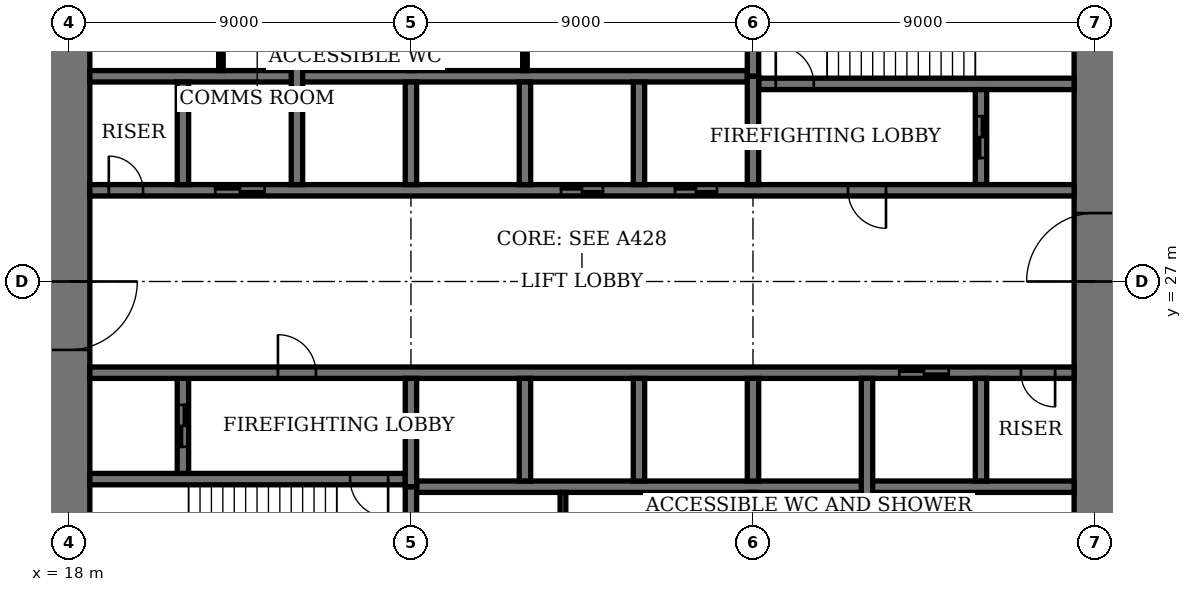
"""IFC4 building model, lengths in metres.
Left out: names, types, materials, properties, quantities, classifications, styles, units other than length and angle.
Written with IfcOpenShell. Run it as: python <this file> out.ifc"""

import sys

from ifc_helpers import new_model, si_unit, direction, frame, frame_2d, origin, place, context, subcontext, project, spatial, rectangle, extrude, element, fill, save


model = new_model("IFC4")
c1 = context("Model", 3, precision=1e-05, world=origin(), true_north=direction((0.0, 1.0)))
c2 = subcontext(c1, "Body", "Model", "MODEL_VIEW")
j1 = project(units=[si_unit("LENGTHUNIT", "METRE"), si_unit("PLANEANGLEUNIT", "RADIAN")], contexts=[c1])
p1 = place(None, origin())
s1 = spatial("IfcSite", under=j1, at=p1, CompositionType="ELEMENT")
p2 = place(p1, origin())
s2 = spatial("IfcBuilding", under=s1, at=p2, CompositionType="ELEMENT")
p3 = place(p2, frame((0.0, 0.0, 93.0)))
s3 = spatial("IfcBuildingStorey", under=s2, at=p3, CompositionType="ELEMENT", Elevation=93.0)
p4 = place(p3, frame((18.0, 35.45, 0.0), z_axis=(0.0, 0.0, 1.0), x_axis=(0.0, -1.0, 0.0)))
e1 = element("IfcWall", 1, at=p4, inside=s3, PredefinedType="SHEAR", context=c2, shape_type="SweptSolid", body=[
    extrude(rectangle(XDim=16.9, YDim=1.1, at=frame_2d((8.45, 0.0))), origin(), (0.0, 0.0, 1.0), 4.0),
])
p5 = place(p4, frame((8.45, 0.0, 0.0)))
e2 = element("IfcOpeningElement", 2, at=p5, cuts=e1, PredefinedType="OPENING", context=c2, shape_type="SweptSolid", body=[
    extrude(rectangle(XDim=1.8, YDim=2.4, at=frame_2d((0.9, 1.2))), frame((0.0, 0.56, 0.0), z_axis=(0.0, -1.0, 0.0), x_axis=(1.0, 0.0, 0.0)), (0.0, 0.0, 1.0), 1.12),
])
p6 = place(p3, frame((45.0, 18.55, 0.0), z_axis=(0.0, 0.0, 1.0), x_axis=(0.0, 1.0, 0.0)))
e3 = element("IfcWall", 3, at=p6, inside=s3, PredefinedType="SHEAR", context=c2, shape_type="SweptSolid", body=[
    extrude(rectangle(XDim=16.9, YDim=1.1, at=frame_2d((8.45, 0.0))), origin(), (0.0, 0.0, 1.0), 4.0),
])
p7 = place(p6, frame((8.45, 0.0, 0.0)))
e4 = element("IfcOpeningElement", 4, at=p7, cuts=e3, PredefinedType="OPENING", context=c2, shape_type="SweptSolid", body=[
    extrude(rectangle(XDim=1.8, YDim=2.4, at=frame_2d((0.9, 1.2))), frame((0.0, 0.56, 0.0), z_axis=(0.0, -1.0, 0.0), x_axis=(1.0, 0.0, 0.0)), (0.0, 0.0, 1.0), 1.12),
])
p8 = place(p3, frame((18.55, 21.8, 0.0), z_axis=(0.0, 0.0, 1.0), x_axis=(1.0, 0.0, 0.0)))
e5 = element("IfcWall", 5, at=p8, inside=s3, PredefinedType="SHEAR", context=c2, shape_type="SweptSolid", body=[
    extrude(rectangle(XDim=8.3, YDim=0.3, at=frame_2d((4.15, 0.0))), origin(), (0.0, 0.0, 1.0), 4.0),
])
p9 = place(p8, frame((6.85, 0.0, 0.0)))
e6 = element("IfcOpeningElement", 6, at=p9, cuts=e5, PredefinedType="OPENING", context=c2, shape_type="SweptSolid", body=[
    extrude(rectangle(XDim=1.0, YDim=2.4, at=frame_2d((0.5, 1.2))), frame((0.0, 0.16, 0.0), z_axis=(0.0, -1.0, 0.0), x_axis=(1.0, 0.0, 0.0)), (0.0, 0.0, 1.0), 0.32),
])
p10 = place(p3, frame((36.15, 32.2, 0.0), z_axis=(0.0, 0.0, 1.0), x_axis=(1.0, 0.0, 0.0)))
e7 = element("IfcWall", 7, at=p10, inside=s3, PredefinedType="SHEAR", context=c2, shape_type="SweptSolid", body=[
    extrude(rectangle(XDim=8.3, YDim=0.3, at=frame_2d((4.15, 0.0))), origin(), (0.0, 0.0, 1.0), 4.0),
])
p11 = place(p10, frame((0.45, 0.0, 0.0)))
e8 = element("IfcOpeningElement", 8, at=p11, cuts=e7, PredefinedType="OPENING", context=c2, shape_type="SweptSolid", body=[
    extrude(rectangle(XDim=1.0, YDim=2.4, at=frame_2d((0.5, 1.2))), frame((0.0, 0.16, 0.0), z_axis=(0.0, -1.0, 0.0), x_axis=(1.0, 0.0, 0.0)), (0.0, 0.0, 1.0), 0.32),
])
for number, where, z_axis, x_axis in (
    (9, (27.0, 18.55, 0.0), (0.0, 0.0, 1.0), (0.0, 1.0, 0.0)),
    (10, (36.0, 32.4, 0.0), (0.0, 0.0, 1.0), (0.0, 1.0, 0.0)),
):
    element("IfcWall", number, at=place(p3, frame(where, z_axis=z_axis, x_axis=x_axis)), inside=s3, PredefinedType="SHEAR", context=c2, shape_type="SweptSolid", body=[
        extrude(rectangle(XDim=3.05, YDim=0.3, at=frame_2d((1.525, 0.0))), origin(), (0.0, 0.0, 1.0), 4.0),
    ])
p12 = place(p3, frame((21.0, 21.95, 0.0), z_axis=(0.0, 0.0, 1.0), x_axis=(0.0, 1.0, 0.0)))
e11 = element("IfcWall", 11, at=p12, inside=s3, PredefinedType="SHEAR", context=c2, shape_type="SweptSolid", body=[
    extrude(rectangle(XDim=2.5, YDim=0.3, at=frame_2d((1.25, 0.0))), origin(), (0.0, 0.0, 1.0), 4.0),
])
p13 = place(p12, frame((0.7, 0.0, 0.0)))
e12 = element("IfcOpeningElement", 12, at=p13, cuts=e11, PredefinedType="OPENING", context=c2, shape_type="SweptSolid", body=[
    extrude(rectangle(XDim=1.1, YDim=2.4, at=frame_2d((0.55, 1.2))), frame((0.0, 0.16, 0.0), z_axis=(0.0, -1.0, 0.0), x_axis=(1.0, 0.0, 0.0)), (0.0, 0.0, 1.0), 0.32),
])
p14 = place(p3, frame((42.0, 29.55, 0.0), z_axis=(0.0, 0.0, 1.0), x_axis=(0.0, 1.0, 0.0)))
e13 = element("IfcWall", 13, at=p14, inside=s3, PredefinedType="SHEAR", context=c2, shape_type="SweptSolid", body=[
    extrude(rectangle(XDim=2.5, YDim=0.3, at=frame_2d((1.25, 0.0))), origin(), (0.0, 0.0, 1.0), 4.0),
])
p15 = place(p14, frame((0.7, 0.0, 0.0)))
e14 = element("IfcOpeningElement", 14, at=p15, cuts=e13, PredefinedType="OPENING", context=c2, shape_type="SweptSolid", body=[
    extrude(rectangle(XDim=1.1, YDim=2.4, at=frame_2d((0.55, 1.2))), frame((0.0, 0.16, 0.0), z_axis=(0.0, -1.0, 0.0), x_axis=(1.0, 0.0, 0.0)), (0.0, 0.0, 1.0), 0.32),
])
p16 = place(p3, frame((18.55, 24.6, 0.0), z_axis=(0.0, 0.0, 1.0), x_axis=(1.0, 0.0, 0.0)))
e15 = element("IfcWall", 15, at=p16, inside=s3, PredefinedType="SHEAR", context=c2, shape_type="SweptSolid", body=[
    extrude(rectangle(XDim=25.9, YDim=0.3, at=frame_2d((12.95, 0.0))), origin(), (0.0, 0.0, 1.0), 4.0),
])
p17 = place(p16, frame((4.95, 0.0, 0.0)))
e16 = element("IfcOpeningElement", 16, at=p17, cuts=e15, PredefinedType="OPENING", context=c2, shape_type="SweptSolid", body=[
    extrude(rectangle(XDim=1.0, YDim=2.4, at=frame_2d((0.5, 1.2))), frame((0.0, 0.16, 0.0), z_axis=(0.0, -1.0, 0.0), x_axis=(1.0, 0.0, 0.0)), (0.0, 0.0, 1.0), 0.32),
])
p18 = place(p16, frame((24.5, 0.0, 0.0)))
e17 = element("IfcOpeningElement", 17, at=p18, cuts=e15, PredefinedType="OPENING", context=c2, shape_type="SweptSolid", body=[
    extrude(rectangle(XDim=0.9, YDim=2.1, at=frame_2d((0.45, 1.05))), frame((0.0, 0.16, 0.0), z_axis=(0.0, -1.0, 0.0), x_axis=(1.0, 0.0, 0.0)), (0.0, 0.0, 1.0), 0.32),
])
p19 = place(p16, frame((21.3, 0.0, 0.0)))
e18 = element("IfcOpeningElement", 18, at=p19, cuts=e15, PredefinedType="OPENING", context=c2, shape_type="SweptSolid", body=[
    extrude(rectangle(XDim=1.3, YDim=2.4, at=frame_2d((0.65, 1.2))), frame((0.0, 0.16, 0.0), z_axis=(0.0, -1.0, 0.0), x_axis=(1.0, 0.0, 0.0)), (0.0, 0.0, 1.0), 0.32),
])
p20 = place(p3, frame((18.55, 29.4, 0.0), z_axis=(0.0, 0.0, 1.0), x_axis=(1.0, 0.0, 0.0)))
e19 = element("IfcWall", 19, at=p20, inside=s3, PredefinedType="SHEAR", context=c2, shape_type="SweptSolid", body=[
    extrude(rectangle(XDim=25.9, YDim=0.3, at=frame_2d((12.95, 0.0))), origin(), (0.0, 0.0, 1.0), 4.0),
])
p21 = place(p20, frame((19.95, 0.0, 0.0)))
e20 = element("IfcOpeningElement", 20, at=p21, cuts=e19, PredefinedType="OPENING", context=c2, shape_type="SweptSolid", body=[
    extrude(rectangle(XDim=1.0, YDim=2.4, at=frame_2d((0.5, 1.2))), frame((0.0, 0.16, 0.0), z_axis=(0.0, -1.0, 0.0), x_axis=(1.0, 0.0, 0.0)), (0.0, 0.0, 1.0), 0.32),
])
p22 = place(p20, frame((0.5, 0.0, 0.0)))
e21 = element("IfcOpeningElement", 21, at=p22, cuts=e19, PredefinedType="OPENING", context=c2, shape_type="SweptSolid", body=[
    extrude(rectangle(XDim=0.9, YDim=2.1, at=frame_2d((0.45, 1.05))), frame((0.0, 0.16, 0.0), z_axis=(0.0, -1.0, 0.0), x_axis=(1.0, 0.0, 0.0)), (0.0, 0.0, 1.0), 0.32),
])
p23 = place(p20, frame((15.4, 0.0, 0.0)))
e22 = element("IfcOpeningElement", 22, at=p23, cuts=e19, PredefinedType="OPENING", context=c2, shape_type="SweptSolid", body=[
    extrude(rectangle(XDim=1.1, YDim=2.4, at=frame_2d((0.55, 1.2))), frame((0.0, 0.16, 0.0), z_axis=(0.0, -1.0, 0.0), x_axis=(1.0, 0.0, 0.0)), (0.0, 0.0, 1.0), 0.32),
])
p24 = place(p20, frame((12.4, 0.0, 0.0)))
e23 = element("IfcOpeningElement", 23, at=p24, cuts=e19, PredefinedType="OPENING", context=c2, shape_type="SweptSolid", body=[
    extrude(rectangle(XDim=1.1, YDim=2.4, at=frame_2d((0.55, 1.2))), frame((0.0, 0.16, 0.0), z_axis=(0.0, -1.0, 0.0), x_axis=(1.0, 0.0, 0.0)), (0.0, 0.0, 1.0), 0.32),
])
p25 = place(p20, frame((3.3, 0.0, 0.0)))
e24 = element("IfcOpeningElement", 24, at=p25, cuts=e19, PredefinedType="OPENING", context=c2, shape_type="SweptSolid", body=[
    extrude(rectangle(XDim=1.3, YDim=2.4, at=frame_2d((0.65, 1.2))), frame((0.0, 0.16, 0.0), z_axis=(0.0, -1.0, 0.0), x_axis=(1.0, 0.0, 0.0)), (0.0, 0.0, 1.0), 0.32),
])
for number, where, z_axis, x_axis in (
    (25, (27.15, 21.6, 0.0), (0.0, 0.0, 1.0), (1.0, 0.0, 0.0)),
    (26, (18.55, 32.4, 0.0), (0.0, 0.0, 1.0), (1.0, 0.0, 0.0)),
):
    element("IfcWall", number, at=place(p3, frame(where, z_axis=z_axis, x_axis=x_axis)), inside=s3, PredefinedType="SHEAR", context=c2, shape_type="SweptSolid", body=[
        extrude(rectangle(XDim=17.3, YDim=0.3, at=frame_2d((8.65, 0.0))), origin(), (0.0, 0.0, 1.0), 4.0),
    ])
for number, where, z_axis, x_axis in (
    (27, (30.0, 21.75, 0.0), (0.0, 0.0, 1.0), (0.0, 1.0, 0.0)),
    (28, (33.0, 29.55, 0.0), (0.0, 0.0, 1.0), (0.0, 1.0, 0.0)),
    (29, (33.0, 21.75, 0.0), (0.0, 0.0, 1.0), (0.0, 1.0, 0.0)),
    (30, (30.0, 29.55, 0.0), (0.0, 0.0, 1.0), (0.0, 1.0, 0.0)),
    (31, (36.0, 21.75, 0.0), (0.0, 0.0, 1.0), (0.0, 1.0, 0.0)),
    (32, (27.0, 29.55, 0.0), (0.0, 0.0, 1.0), (0.0, 1.0, 0.0)),
):
    element("IfcWall", number, at=place(p3, frame(where, z_axis=z_axis, x_axis=x_axis)), inside=s3, PredefinedType="SHEAR", context=c2, shape_type="SweptSolid", body=[
        extrude(rectangle(XDim=2.7, YDim=0.3, at=frame_2d((1.35, 0.0))), origin(), (0.0, 0.0, 1.0), 4.0),
    ])
for number, where, z_axis, x_axis in (
    (33, (39.0, 18.55, 0.0), (0.0, 0.0, 1.0), (0.0, 1.0, 0.0)),
    (34, (24.0, 29.55, 0.0), (0.0, 0.0, 1.0), (0.0, 1.0, 0.0)),
):
    element("IfcWall", number, at=place(p3, frame(where, z_axis=z_axis, x_axis=x_axis)), inside=s3, PredefinedType="SHEAR", context=c2, shape_type="SweptSolid", body=[
        extrude(rectangle(XDim=5.9, YDim=0.3, at=frame_2d((2.95, 0.0))), origin(), (0.0, 0.0, 1.0), 4.0),
    ])
for number, where, z_axis, x_axis in (
    (35, (42.0, 21.75, 0.0), (0.0, 0.0, 1.0), (0.0, 1.0, 0.0)),
    (36, (21.0, 29.55, 0.0), (0.0, 0.0, 1.0), (0.0, 1.0, 0.0)),
):
    element("IfcWall", number, at=place(p3, frame(where, z_axis=z_axis, x_axis=x_axis)), inside=s3, PredefinedType="SHEAR", context=c2, shape_type="SweptSolid", body=[
        extrude(rectangle(XDim=2.7, YDim=0.3, at=frame_2d((1.35, 0.0))), origin(), (0.0, 0.0, 1.0), 4.0),
    ])
for number, where, z_axis, x_axis in (
    (37, (27.0, 21.6, 0.0), (0.0, 0.0, 1.0), (0.0, 1.0, 0.0)),
    (38, (36.0, 29.55, 0.0), (0.0, 0.0, 1.0), (0.0, 1.0, 0.0)),
):
    element("IfcWall", number, at=place(p3, frame(where, z_axis=z_axis, x_axis=x_axis)), inside=s3, PredefinedType="SHEAR", context=c2, shape_type="SweptSolid", body=[
        extrude(rectangle(XDim=2.85, YDim=0.3, at=frame_2d((1.425, 0.0))), origin(), (0.0, 0.0, 1.0), 4.0),
    ])
for number, where, z_axis, x_axis in (
    (39, (31.0, 18.55, 0.0), (0.0, 0.0, 1.0), (0.0, 1.0, 0.0)),
    (40, (36.0, 18.55, 0.0), (0.0, 0.0, 1.0), (0.0, 1.0, 0.0)),
):
    element("IfcWall", number, at=place(p3, frame(where, z_axis=z_axis, x_axis=x_axis)), inside=s3, PredefinedType="PARTITIONING", context=c2, shape_type="SweptSolid", body=[
        extrude(rectangle(XDim=2.9, YDim=0.15, at=frame_2d((1.45, 0.0))), origin(), (0.0, 0.0, 1.0), 3.75),
    ])
p26 = place(p3, frame((30.0, 32.55, 0.0), z_axis=(0.0, 0.0, 1.0), x_axis=(0.0, 1.0, 0.0)))
e41 = element("IfcWall", 41, at=p26, inside=s3, PredefinedType="PARTITIONING", context=c2, shape_type="SweptSolid", body=[
    extrude(rectangle(XDim=2.9, YDim=0.12, at=frame_2d((1.45, 0.0))), origin(), (0.0, 0.0, 1.0), 3.75),
])
p27 = place(p3, frame((27.0, 32.55, 0.0), z_axis=(0.0, 0.0, 1.0), x_axis=(0.0, 1.0, 0.0)))
e42 = element("IfcWall", 42, at=p27, inside=s3, PredefinedType="PARTITIONING", context=c2, shape_type="SweptSolid", body=[
    extrude(rectangle(XDim=2.9, YDim=0.15, at=frame_2d((1.45, 0.0))), origin(), (0.0, 0.0, 1.0), 3.75),
])
p28 = place(p3, frame((22.0, 32.55, 0.0), z_axis=(0.0, 0.0, 1.0), x_axis=(0.0, 1.0, 0.0)))
e43 = element("IfcWall", 43, at=p28, inside=s3, PredefinedType="PARTITIONING", context=c2, shape_type="SweptSolid", body=[
    extrude(rectangle(XDim=2.9, YDim=0.12, at=frame_2d((1.45, 0.0))), origin(), (0.0, 0.0, 1.0), 3.75),
])
p29 = place(p28, frame((0.95, 0.0, 0.0)))
e44 = element("IfcOpeningElement", 44, at=p29, cuts=e43, PredefinedType="OPENING", context=c2, shape_type="SweptSolid", body=[
    extrude(rectangle(XDim=1.0, YDim=2.4, at=frame_2d((0.5, 1.2))), frame((0.0, 0.07, 0.0), z_axis=(0.0, -1.0, 0.0), x_axis=(1.0, 0.0, 0.0)), (0.0, 0.0, 1.0), 0.14),
])
p30 = place(p5, origin())
e45 = element("IfcDoor", 45, at=p30, inside=s3, OperationType="DOUBLE_DOOR_DOUBLE_SWING", PredefinedType="DOOR", context=c2, shape_type="SweptSolid", body=[
    extrude(rectangle(XDim=1.8, YDim=2.4, at=frame_2d((0.9, 1.2))), frame((0.0, 0.03, 0.0), z_axis=(0.0, -1.0, 0.0), x_axis=(1.0, 0.0, 0.0)), (0.0, 0.0, 1.0), 0.06),
    extrude(rectangle(XDim=0.04, YDim=2.4, at=frame_2d((0.02, 1.2))), frame((0.0, 0.55, 0.0), z_axis=(0.0, -1.0, 0.0), x_axis=(1.0, 0.0, 0.0)), (0.0, 0.0, 1.0), 1.1),
    extrude(rectangle(XDim=0.04, YDim=2.4, at=frame_2d((1.78, 1.2))), frame((0.0, 0.55, 0.0), z_axis=(0.0, -1.0, 0.0), x_axis=(1.0, 0.0, 0.0)), (0.0, 0.0, 1.0), 1.1),
    extrude(rectangle(XDim=1.8, YDim=0.04, at=frame_2d((0.9, 2.38))), frame((0.0, 0.55, 0.0), z_axis=(0.0, -1.0, 0.0), x_axis=(1.0, 0.0, 0.0)), (0.0, 0.0, 1.0), 1.1),
])
fill(e2, e45)
p31 = place(p7, origin())
e46 = element("IfcDoor", 46, at=p31, inside=s3, OperationType="DOUBLE_DOOR_DOUBLE_SWING", PredefinedType="DOOR", context=c2, shape_type="SweptSolid", body=[
    extrude(rectangle(XDim=1.8, YDim=2.4, at=frame_2d((0.9, 1.2))), frame((0.0, 0.03, 0.0), z_axis=(0.0, -1.0, 0.0), x_axis=(1.0, 0.0, 0.0)), (0.0, 0.0, 1.0), 0.06),
    extrude(rectangle(XDim=0.04, YDim=2.4, at=frame_2d((0.02, 1.2))), frame((0.0, 0.55, 0.0), z_axis=(0.0, -1.0, 0.0), x_axis=(1.0, 0.0, 0.0)), (0.0, 0.0, 1.0), 1.1),
    extrude(rectangle(XDim=0.04, YDim=2.4, at=frame_2d((1.78, 1.2))), frame((0.0, 0.55, 0.0), z_axis=(0.0, -1.0, 0.0), x_axis=(1.0, 0.0, 0.0)), (0.0, 0.0, 1.0), 1.1),
    extrude(rectangle(XDim=1.8, YDim=0.04, at=frame_2d((0.9, 2.38))), frame((0.0, 0.55, 0.0), z_axis=(0.0, -1.0, 0.0), x_axis=(1.0, 0.0, 0.0)), (0.0, 0.0, 1.0), 1.1),
])
fill(e4, e46)
p32 = place(p9, origin())
e47 = element("IfcDoor", 47, at=p32, inside=s3, OperationType="SINGLE_SWING_RIGHT", PredefinedType="DOOR", context=c2, shape_type="SweptSolid", body=[
    extrude(rectangle(XDim=1.0, YDim=2.4, at=frame_2d((0.5, 1.2))), frame((0.0, 0.03, 0.0), z_axis=(0.0, -1.0, 0.0), x_axis=(1.0, 0.0, 0.0)), (0.0, 0.0, 1.0), 0.06),
])
fill(e6, e47)
p33 = place(p11, origin())
e48 = element("IfcDoor", 48, at=p33, inside=s3, OperationType="SINGLE_SWING_RIGHT", PredefinedType="DOOR", context=c2, shape_type="SweptSolid", body=[
    extrude(rectangle(XDim=1.0, YDim=2.4, at=frame_2d((0.5, 1.2))), frame((0.0, 0.03, 0.0), z_axis=(0.0, -1.0, 0.0), x_axis=(1.0, 0.0, 0.0)), (0.0, 0.0, 1.0), 0.06),
])
fill(e8, e48)
p34 = place(p17, origin())
e49 = element("IfcDoor", 49, at=p34, inside=s3, OperationType="SINGLE_SWING_RIGHT", PredefinedType="DOOR", context=c2, shape_type="SweptSolid", body=[
    extrude(rectangle(XDim=1.0, YDim=2.4, at=frame_2d((0.5, 1.2))), frame((0.0, 0.03, 0.0), z_axis=(0.0, -1.0, 0.0), x_axis=(1.0, 0.0, 0.0)), (0.0, 0.0, 1.0), 0.06),
])
fill(e16, e49)
p35 = place(p21, origin())
e50 = element("IfcDoor", 50, at=p35, inside=s3, OperationType="SINGLE_SWING_RIGHT", PredefinedType="DOOR", context=c2, shape_type="SweptSolid", body=[
    extrude(rectangle(XDim=1.0, YDim=2.4, at=frame_2d((0.5, 1.2))), frame((0.0, 0.03, 0.0), z_axis=(0.0, -1.0, 0.0), x_axis=(1.0, 0.0, 0.0)), (0.0, 0.0, 1.0), 0.06),
])
fill(e20, e50)
p36 = place(p18, origin())
e51 = element("IfcDoor", 51, at=p36, inside=s3, OperationType="SINGLE_SWING_RIGHT", PredefinedType="DOOR", context=c2, shape_type="SweptSolid", body=[
    extrude(rectangle(XDim=0.9, YDim=2.1, at=frame_2d((0.45, 1.05))), frame((0.0, 0.03, 0.0), z_axis=(0.0, -1.0, 0.0), x_axis=(1.0, 0.0, 0.0)), (0.0, 0.0, 1.0), 0.06),
])
fill(e17, e51)
p37 = place(p22, origin())
e52 = element("IfcDoor", 52, at=p37, inside=s3, OperationType="SINGLE_SWING_RIGHT", PredefinedType="DOOR", context=c2, shape_type="SweptSolid", body=[
    extrude(rectangle(XDim=0.9, YDim=2.1, at=frame_2d((0.45, 1.05))), frame((0.0, 0.03, 0.0), z_axis=(0.0, -1.0, 0.0), x_axis=(1.0, 0.0, 0.0)), (0.0, 0.0, 1.0), 0.06),
])
fill(e21, e52)
p38 = place(p23, origin())
e53 = element("IfcDoor", 53, at=p38, inside=s3, OperationType="DOUBLE_DOOR_SLIDING", PredefinedType="DOOR", context=c2, shape_type="SweptSolid", body=[
    extrude(rectangle(XDim=1.1, YDim=2.4, at=frame_2d((0.55, 1.2))), frame((0.0, 0.02, 0.0), z_axis=(0.0, -1.0, 0.0), x_axis=(1.0, 0.0, 0.0)), (0.0, 0.0, 1.0), 0.04),
])
fill(e22, e53)
p39 = place(p24, origin())
e54 = element("IfcDoor", 54, at=p39, inside=s3, OperationType="DOUBLE_DOOR_SLIDING", PredefinedType="DOOR", context=c2, shape_type="SweptSolid", body=[
    extrude(rectangle(XDim=1.1, YDim=2.4, at=frame_2d((0.55, 1.2))), frame((0.0, 0.02, 0.0), z_axis=(0.0, -1.0, 0.0), x_axis=(1.0, 0.0, 0.0)), (0.0, 0.0, 1.0), 0.04),
])
fill(e23, e54)
p40 = place(p19, origin())
e55 = element("IfcDoor", 55, at=p40, inside=s3, OperationType="DOUBLE_DOOR_SLIDING", PredefinedType="DOOR", context=c2, shape_type="SweptSolid", body=[
    extrude(rectangle(XDim=1.3, YDim=2.4, at=frame_2d((0.65, 1.2))), frame((0.0, 0.02, 0.0), z_axis=(0.0, -1.0, 0.0), x_axis=(1.0, 0.0, 0.0)), (0.0, 0.0, 1.0), 0.04),
])
fill(e18, e55)
p41 = place(p25, origin())
e56 = element("IfcDoor", 56, at=p41, inside=s3, OperationType="DOUBLE_DOOR_SLIDING", PredefinedType="DOOR", context=c2, shape_type="SweptSolid", body=[
    extrude(rectangle(XDim=1.3, YDim=2.4, at=frame_2d((0.65, 1.2))), frame((0.0, 0.02, 0.0), z_axis=(0.0, -1.0, 0.0), x_axis=(1.0, 0.0, 0.0)), (0.0, 0.0, 1.0), 0.04),
])
fill(e24, e56)
p42 = place(p13, origin())
e57 = element("IfcDoor", 57, at=p42, inside=s3, OperationType="DOUBLE_DOOR_SLIDING", PredefinedType="DOOR", context=c2, shape_type="SweptSolid", body=[
    extrude(rectangle(XDim=1.1, YDim=2.4, at=frame_2d((0.55, 1.2))), frame((0.0, 0.03, 0.0), z_axis=(0.0, -1.0, 0.0), x_axis=(1.0, 0.0, 0.0)), (0.0, 0.0, 1.0), 0.06),
])
fill(e12, e57)
p43 = place(p15, origin())
e58 = element("IfcDoor", 58, at=p43, inside=s3, OperationType="DOUBLE_DOOR_SLIDING", PredefinedType="DOOR", context=c2, shape_type="SweptSolid", body=[
    extrude(rectangle(XDim=1.1, YDim=2.4, at=frame_2d((0.55, 1.2))), frame((0.0, 0.03, 0.0), z_axis=(0.0, -1.0, 0.0), x_axis=(1.0, 0.0, 0.0)), (0.0, 0.0, 1.0), 0.06),
])
fill(e14, e58)
save(model, sys.argv[1])
